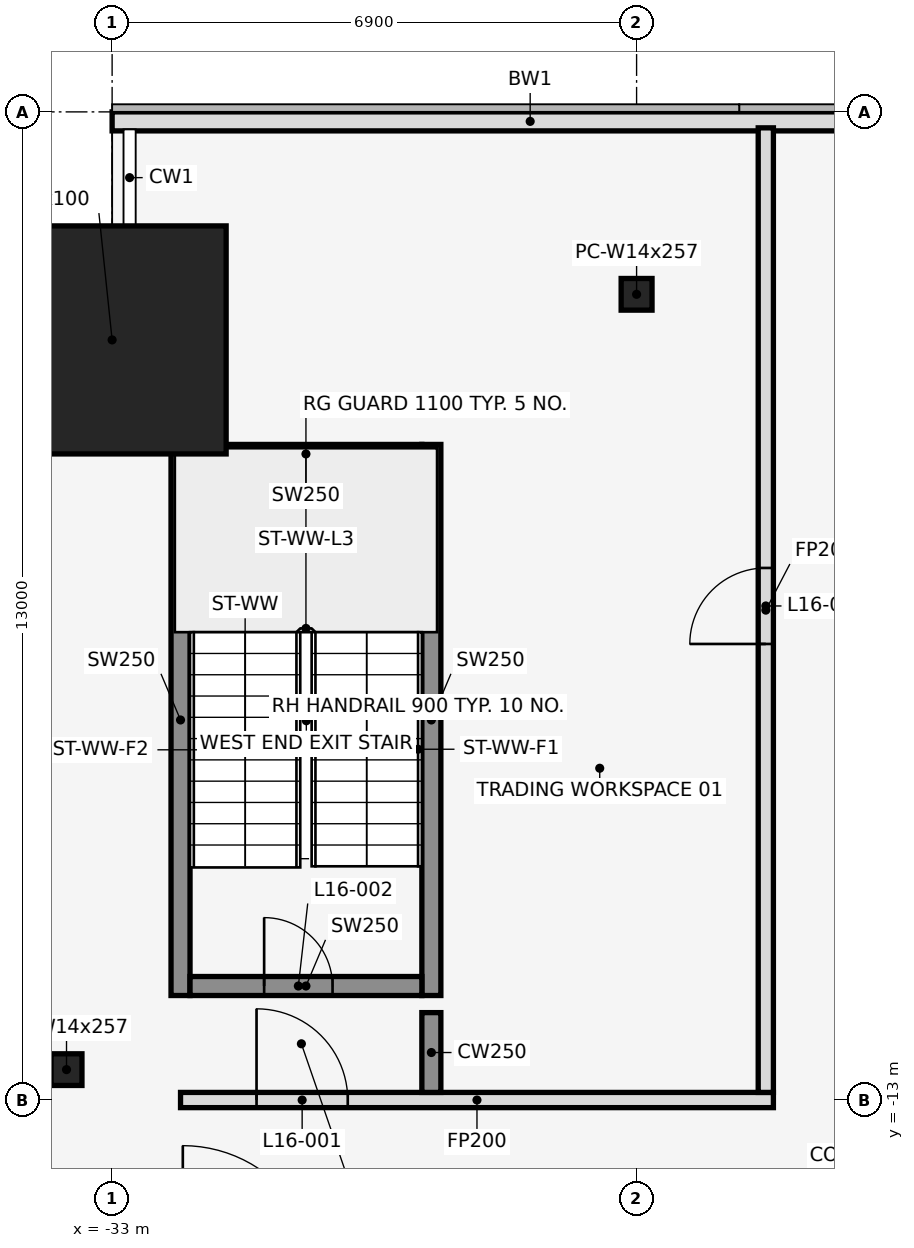
"""IFC4 building model, lengths in metres.
Left out: names, types, materials, properties, quantities, classifications, styles, units other than length and angle.
Written with IfcOpenShell. Run it as: python <this file> out.ifc"""

import sys

from ifc_helpers import new_model, si_unit, direction, frame, frame_2d, origin, origin_2d, place, context, subcontext, project, spatial, rectangle, hollow_rectangle, i_section, extrude, element, fill, save


model = new_model("IFC4")
c1 = context("Model", 3, precision=1e-05, world=origin(), true_north=direction((0.0, 1.0)))
c2 = subcontext(c1, "Body", "Model", "MODEL_VIEW")
j1 = project(units=[si_unit("LENGTHUNIT", "METRE"), si_unit("PLANEANGLEUNIT", "RADIAN")], contexts=[c1])
p1 = place(None, origin())
s1 = spatial("IfcSite", under=j1, at=p1, CompositionType="ELEMENT")
p2 = place(p1, origin())
s2 = spatial("IfcBuilding", under=s1, at=p2, CompositionType="ELEMENT")
p3 = place(p2, frame((0.0, 0.0, 80.0)))
s3 = spatial("IfcBuildingStorey", under=s2, at=p3, CompositionType="ELEMENT", Elevation=80.0)
p4 = place(p3, frame((-33.0, -3.0, 0.0), z_axis=(0.0, 0.0, 1.0), x_axis=(1.0, 0.0, 0.0)))
e1 = element("IfcColumn", 1, at=p4, inside=s3, PredefinedType="COLUMN", context=c2, shape_type="SweptSolid", body=[
    extrude(hollow_rectangle(XDim=3.0, YDim=3.0, WallThickness=0.1, at=origin_2d()), origin(), (0.0, 0.0, 1.0), 4.5),
])
for number, where, z_axis, x_axis in (
    (2, (-26.1, -2.4, 0.0), (0.0, 0.0, 1.0), (1.0, 0.0, 0.0)),
    (3, (-33.6, -12.6, 0.0), (0.0, 0.0, 1.0), (1.0, 0.0, 0.0)),
):
    element("IfcColumn", number, at=place(p3, frame(where, z_axis=z_axis, x_axis=x_axis)), inside=s3, PredefinedType="COLUMN", context=c2, shape_type="SweptSolid", body=[
        extrude(i_section(OverallWidth=0.406, OverallDepth=0.417, WebThickness=0.03, FlangeThickness=0.048, at=origin_2d()), origin(), (0.0, 0.0, 1.0), 4.5),
    ])
p5 = place(p3, frame((-22.0, -0.125, 0.0), z_axis=(0.0, 0.0, 1.0), x_axis=(-1.0, 0.0, 0.0)))
e4 = element("IfcWall", 4, at=p5, inside=s3, PredefinedType="STANDARD", context=c2, shape_type="SweptSolid", body=[
    extrude(rectangle(XDim=11.0, YDim=0.25, at=frame_2d((5.5, 0.0))), origin(), (0.0, 0.0, 1.0), 4.3),
])
for number, where, z_axis, x_axis in (
    (5, (-32.1, -11.625, 0.0), (0.0, 0.0, 1.0), (0.0, 1.0, 0.0)),
    (6, (-28.8, -11.625, 0.0), (0.0, 0.0, 1.0), (0.0, 1.0, 0.0)),
):
    element("IfcWall", number, at=place(p3, frame(where, z_axis=z_axis, x_axis=x_axis)), inside=s3, PredefinedType="SHEAR", context=c2, shape_type="SweptSolid", body=[
        extrude(rectangle(XDim=7.25, YDim=0.25, at=frame_2d((3.625, 0.0))), origin(), (0.0, 0.0, 1.0), 4.5),
    ])
p6 = place(p3, frame((-31.975, -11.5, 0.0), z_axis=(0.0, 0.0, 1.0), x_axis=(1.0, 0.0, 0.0)))
e7 = element("IfcWall", 7, at=p6, inside=s3, PredefinedType="SHEAR", context=c2, shape_type="SweptSolid", body=[
    extrude(rectangle(XDim=3.05, YDim=0.25, at=frame_2d((1.525, 0.0))), origin(), (0.0, 0.0, 1.0), 4.5),
])
p7 = place(p6, frame((0.975, 0.0, 0.0)))
e8 = element("IfcOpeningElement", 8, at=p7, cuts=e7, PredefinedType="OPENING", context=c2, shape_type="SweptSolid", body=[
    extrude(rectangle(XDim=0.9, YDim=2.1, at=frame_2d((0.45, 1.05))), frame((0.0, 0.137, 0.0), z_axis=(0.0, -1.0, 0.0), x_axis=(1.0, 0.0, 0.0)), (0.0, 0.0, 1.0), 0.274),
])
p8 = place(p3, frame((-31.975, -4.5, 0.0), z_axis=(0.0, 0.0, 1.0), x_axis=(1.0, 0.0, 0.0)))
e9 = element("IfcWall", 9, at=p8, inside=s3, PredefinedType="SHEAR", context=c2, shape_type="SweptSolid", body=[
    extrude(rectangle(XDim=3.05, YDim=0.25, at=frame_2d((1.525, 0.0))), origin(), (0.0, 0.0, 1.0), 4.5),
])
p9 = place(p3, frame((-32.1, -13.0, 0.0), z_axis=(0.0, 0.0, 1.0), x_axis=(1.0, 0.0, 0.0)))
e10 = element("IfcWall", 10, at=p9, inside=s3, PredefinedType="PARTITIONING", context=c2, shape_type="SweptSolid", body=[
    extrude(rectangle(XDim=7.8, YDim=0.2, at=frame_2d((3.9, 0.0))), origin(), (0.0, 0.0, 1.0), 3.368),
])
p10 = place(p9, frame((1.0, 0.0, 0.0)))
e11 = element("IfcOpeningElement", 11, at=p10, cuts=e10, PredefinedType="OPENING", context=c2, shape_type="SweptSolid", body=[
    extrude(rectangle(XDim=1.2, YDim=2.1, at=frame_2d((0.6, 1.05))), frame((0.0, 0.112, 0.0), z_axis=(0.0, -1.0, 0.0), x_axis=(1.0, 0.0, 0.0)), (0.0, 0.0, 1.0), 0.224),
])
p11 = place(p3, frame((-28.8, -12.9, 0.0), z_axis=(0.0, 0.0, 1.0), x_axis=(0.0, 1.0, 0.0)))
e12 = element("IfcWall", 12, at=p11, inside=s3, PredefinedType="SHEAR", context=c2, shape_type="SweptSolid", body=[
    extrude(rectangle(XDim=1.05, YDim=0.25, at=frame_2d((0.525, 0.0))), origin(), (0.0, 0.0, 1.0), 4.5),
])
p12 = place(p3, frame((-24.4, -12.9, 0.0), z_axis=(0.0, 0.0, 1.0), x_axis=(0.0, 1.0, 0.0)))
e13 = element("IfcWall", 13, at=p12, inside=s3, PredefinedType="PARTITIONING", context=c2, shape_type="SweptSolid", body=[
    extrude(rectangle(XDim=12.69, YDim=0.2, at=frame_2d((6.345, 0.0))), origin(), (0.0, 0.0, 1.0), 3.368),
])
p13 = place(p12, frame((5.9, 0.0, 0.0)))
e14 = element("IfcOpeningElement", 14, at=p13, cuts=e13, PredefinedType="OPENING", context=c2, shape_type="SweptSolid", body=[
    extrude(rectangle(XDim=1.0, YDim=2.1, at=frame_2d((0.5, 1.05))), frame((0.0, 0.112, 0.0), z_axis=(0.0, -1.0, 0.0), x_axis=(1.0, 0.0, 0.0)), (0.0, 0.0, 1.0), 0.224),
])
p14 = place(p10, origin())
e15 = element("IfcDoor", 15, at=p14, inside=s3, OperationType="SINGLE_SWING_LEFT", PredefinedType="DOOR", context=c2, shape_type="SweptSolid", body=[
    extrude(rectangle(XDim=1.2, YDim=2.1, at=frame_2d((0.6, 1.05))), frame((0.0, 0.025, 0.0), z_axis=(0.0, -1.0, 0.0), x_axis=(1.0, 0.0, 0.0)), (0.0, 0.0, 1.0), 0.05),
])
fill(e11, e15)
p15 = place(p7, origin())
e16 = element("IfcDoor", 16, at=p15, inside=s3, OperationType="SINGLE_SWING_LEFT", PredefinedType="DOOR", context=c2, shape_type="SweptSolid", body=[
    extrude(rectangle(XDim=0.9, YDim=2.1, at=frame_2d((0.45, 1.05))), frame((0.0, 0.025, 0.0), z_axis=(0.0, -1.0, 0.0), x_axis=(1.0, 0.0, 0.0)), (0.0, 0.0, 1.0), 0.05),
])
fill(e8, e16)
p16 = place(p13, origin())
e17 = element("IfcDoor", 17, at=p16, inside=s3, OperationType="SINGLE_SWING_LEFT", PredefinedType="DOOR", context=c2, shape_type="SweptSolid", body=[
    extrude(rectangle(XDim=1.0, YDim=2.1, at=frame_2d((0.5, 1.05))), frame((0.0, 0.025, 0.0), z_axis=(0.0, -1.0, 0.0), x_axis=(1.0, 0.0, 0.0)), (0.0, 0.0, 1.0), 0.05),
])
fill(e14, e17)
save(model, sys.argv[1])
